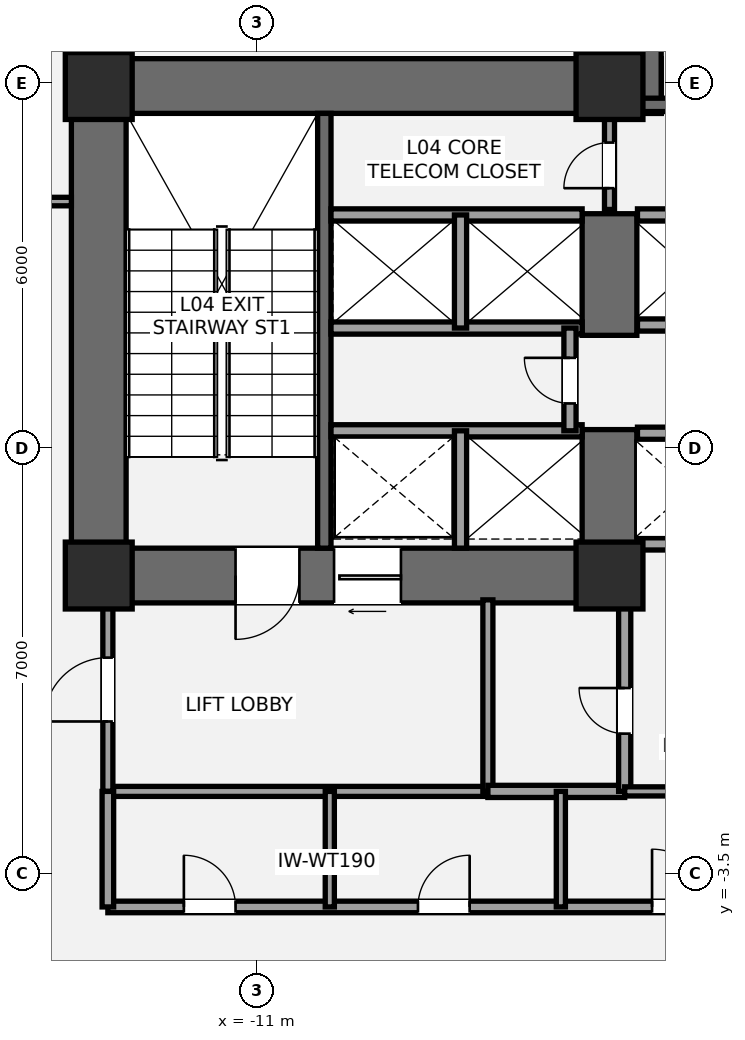
"""IFC4 building model, lengths in metres.
Left out: names, types, materials, properties, quantities, classifications, styles, units other than length and angle.
Written with IfcOpenShell. Run it as: python <this file> out.ifc"""

import sys

from ifc_helpers import new_model, si_unit, direction, frame, frame_2d, origin, origin_2d, place, context, subcontext, project, spatial, rectangle, extrude, element, fill, save


model = new_model("IFC4")
c1 = context("Model", 3, precision=1e-05, world=origin(), true_north=direction((0.0, 1.0)))
c2 = subcontext(c1, "Body", "Model", "MODEL_VIEW")
j1 = project(units=[si_unit("LENGTHUNIT", "METRE"), si_unit("PLANEANGLEUNIT", "RADIAN")], contexts=[c1])
p1 = place(None, origin())
s1 = spatial("IfcSite", under=j1, at=p1, CompositionType="ELEMENT")
p2 = place(p1, origin())
s2 = spatial("IfcBuilding", under=s1, at=p2, CompositionType="ELEMENT")
p3 = place(p2, frame((0.0, 0.0, 18.6)))
s3 = spatial("IfcBuildingStorey", under=s2, at=p3, CompositionType="ELEMENT", Elevation=18.6)
p4 = place(p3, frame((-13.6, 0.95, 0.0), z_axis=(0.0, 0.0, 1.0), x_axis=(0.0, 1.0, 0.0)))
e1 = element("IfcWall", 1, at=p4, inside=s3, PredefinedType="SHEAR", context=c2, shape_type="SweptSolid", body=[
    extrude(rectangle(XDim=8.95, YDim=0.9, at=frame_2d((4.475, 0.0))), origin(), (0.0, 0.0, 1.0), 4.2),
])
p5 = place(p3, frame((-14.05, 9.45, 0.0), z_axis=(0.0, 0.0, 1.0), x_axis=(1.0, 0.0, 0.0)))
e2 = element("IfcWall", 2, at=p5, inside=s3, PredefinedType="SHEAR", context=c2, shape_type="SweptSolid", body=[
    extrude(rectangle(XDim=9.7, YDim=0.9, at=frame_2d((4.85, 0.0))), origin(), (0.0, 0.0, 1.0), 4.2),
])
p6 = place(p3, frame((-4.75, 1.4, 0.0), z_axis=(0.0, 0.0, 1.0), x_axis=(-1.0, 0.0, 0.0)))
e3 = element("IfcWall", 3, at=p6, inside=s3, PredefinedType="SHEAR", context=c2, shape_type="SweptSolid", body=[
    extrude(rectangle(XDim=9.3, YDim=0.9, at=frame_2d((4.65, 0.0))), origin(), (0.0, 0.0, 1.0), 4.2),
])
p7 = place(p6, frame((5.55, 0.0, 0.0)))
e4 = element("IfcOpeningElement", 4, at=p7, cuts=e3, PredefinedType="OPENING", context=c2, shape_type="SweptSolid", body=[
    extrude(rectangle(XDim=1.05, YDim=2.15, at=frame_2d((0.525, 1.075))), frame((0.0, 0.46, 0.0), z_axis=(0.0, -1.0, 0.0), x_axis=(1.0, 0.0, 0.0)), (0.0, 0.0, 1.0), 0.92),
])
p8 = place(p6, frame((3.88, 0.0, 0.0)))
e5 = element("IfcOpeningElement", 5, at=p8, cuts=e3, PredefinedType="OPENING", context=c2, shape_type="SweptSolid", body=[
    extrude(rectangle(XDim=1.1, YDim=2.2, at=frame_2d((0.55, 1.1))), frame((0.0, 0.46, 0.0), z_axis=(0.0, -1.0, 0.0), x_axis=(1.0, 0.0, 0.0)), (0.0, 0.0, 1.0), 0.92),
])
p9 = place(p3, frame((-5.2, 0.95, 0.0), z_axis=(0.0, 0.0, 1.0), x_axis=(0.0, 1.0, 0.0)))
e6 = element("IfcWall", 6, at=p9, inside=s3, PredefinedType="SHEAR", context=c2, shape_type="SweptSolid", body=[
    extrude(rectangle(XDim=2.85, YDim=0.9, at=frame_2d((1.425, 0.0))), origin(), (0.0, 0.0, 1.0), 4.2),
])
p10 = place(p3, frame((-5.2, 5.35, 0.0), z_axis=(0.0, 0.0, 1.0), x_axis=(0.0, 1.0, 0.0)))
e7 = element("IfcWall", 7, at=p10, inside=s3, PredefinedType="SHEAR", context=c2, shape_type="SweptSolid", body=[
    extrude(rectangle(XDim=2.0, YDim=0.9, at=frame_2d((1.0, 0.0))), origin(), (0.0, 0.0, 1.0), 4.2),
])
p11 = place(p3, frame((-9.89, 1.85, 0.0), z_axis=(0.0, 0.0, 1.0), x_axis=(0.0, 1.0, 0.0)))
e8 = element("IfcWall", 8, at=p11, inside=s3, PredefinedType="SHEAR", context=c2, shape_type="SweptSolid", body=[
    extrude(rectangle(XDim=7.15, YDim=0.22, at=frame_2d((3.575, 0.0))), origin(), (0.0, 0.0, 1.0), 4.2),
])
p12 = place(p3, frame((-4.8, 9.0, 0.0), z_axis=(0.0, 0.0, 1.0), x_axis=(0.0, 1.0, 0.0)))
e9 = element("IfcWall", 9, at=p12, inside=s3, PredefinedType="SHEAR", context=c2, shape_type="SweptSolid", body=[
    extrude(rectangle(XDim=4.3, YDim=0.9, at=frame_2d((2.15, 0.0))), origin(), (0.0, 0.0, 1.0), 4.2),
])
p13 = place(p3, frame((-4.7, 9.14, 0.0), z_axis=(0.0, 0.0, 1.0), x_axis=(1.0, 0.0, 0.0)))
e10 = element("IfcWall", 10, at=p13, inside=s3, PredefinedType="SHEAR", context=c2, shape_type="SweptSolid", body=[
    extrude(rectangle(XDim=9.3, YDim=0.22, at=frame_2d((4.65, 0.0))), origin(), (0.0, 0.0, 1.0), 4.2),
])
p14 = place(p13, frame((1.15, 0.0, 0.0)))
e11 = element("IfcOpeningElement", 11, at=p14, cuts=e10, PredefinedType="OPENING", context=c2, shape_type="SweptSolid", body=[
    extrude(rectangle(XDim=1.05, YDim=2.15, at=frame_2d((0.525, 1.075))), frame((0.0, 0.12, 0.0), z_axis=(0.0, -1.0, 0.0), x_axis=(1.0, 0.0, 0.0)), (0.0, 0.0, 1.0), 0.24),
])
for number, where, z_axis, x_axis in (
    (12, (-13.6, 1.4, 0.0), (0.0, 0.0, 1.0), (1.0, 0.0, 0.0)),
    (13, (-13.6, 9.45, 0.0), (0.0, 0.0, 1.0), (1.0, 0.0, 0.0)),
    (14, (-5.2, 1.4, 0.0), (0.0, 0.0, 1.0), (1.0, 0.0, 0.0)),
    (15, (-5.2, 9.45, 0.0), (0.0, 0.0, 1.0), (1.0, 0.0, 0.0)),
):
    element("IfcColumn", number, at=place(p3, frame(where, z_axis=z_axis, x_axis=x_axis)), inside=s3, PredefinedType="COLUMN", context=c2, shape_type="SweptSolid", body=[
        extrude(rectangle(XDim=1.1, YDim=1.1, at=origin_2d()), origin(), (0.0, 0.0, 1.0), 4.2),
    ])
p15 = place(p3, frame((-13.45, -2.15, 0.0), z_axis=(0.0, 0.0, 1.0), x_axis=(1.0, 0.0, 0.0)))
e16 = element("IfcWall", 16, at=p15, inside=s3, PredefinedType="PARTITIONING", context=c2, shape_type="SweptSolid", body=[
    extrude(rectangle(XDim=6.25, YDim=0.165, at=frame_2d((3.125, 0.0))), origin(), (0.0, 0.0, 1.0), 3.98),
])
p16 = place(p3, frame((-13.45, -2.15, 0.0), z_axis=(0.0, 0.0, 1.0), x_axis=(0.0, 1.0, 0.0)))
e17 = element("IfcWall", 17, at=p16, inside=s3, PredefinedType="PARTITIONING", context=c2, shape_type="SweptSolid", body=[
    extrude(rectangle(XDim=3.15, YDim=0.165, at=frame_2d((1.575, 0.0))), origin(), (0.0, 0.0, 1.0), 3.433),
])
p17 = place(p16, frame((1.15, 0.0, 0.0)))
e18 = element("IfcOpeningElement", 18, at=p17, cuts=e17, PredefinedType="OPENING", context=c2, shape_type="SweptSolid", body=[
    extrude(rectangle(XDim=1.05, YDim=2.15, at=frame_2d((0.525, 1.075))), frame((0.0, 0.093, 0.0), z_axis=(0.0, -1.0, 0.0), x_axis=(1.0, 0.0, 0.0)), (0.0, 0.0, 1.0), 0.185),
])
p18 = place(p3, frame((-7.2, -2.15, 0.0), z_axis=(0.0, 0.0, 1.0), x_axis=(0.0, 1.0, 0.0)))
e19 = element("IfcWall", 19, at=p18, inside=s3, PredefinedType="PARTITIONING", context=c2, shape_type="SweptSolid", body=[
    extrude(rectangle(XDim=3.15, YDim=0.165, at=frame_2d((1.575, 0.0))), origin(), (0.0, 0.0, 1.0), 3.98),
])
p19 = place(p3, frame((-7.2, -2.15, 0.0), z_axis=(0.0, 0.0, 1.0), x_axis=(1.0, 0.0, 0.0)))
e20 = element("IfcWall", 20, at=p19, inside=s3, PredefinedType="SOLIDWALL", context=c2, shape_type="SweptSolid", body=[
    extrude(rectangle(XDim=2.25, YDim=0.2, at=frame_2d((1.125, 0.0))), origin(), (0.0, 0.0, 1.0), 3.98),
])
p20 = place(p3, frame((-4.95, -2.15, 0.0), z_axis=(0.0, 0.0, 1.0), x_axis=(0.0, 1.0, 0.0)))
e21 = element("IfcWall", 21, at=p20, inside=s3, PredefinedType="SOLIDWALL", context=c2, shape_type="SweptSolid", body=[
    extrude(rectangle(XDim=3.15, YDim=0.2, at=frame_2d((1.575, 0.0))), origin(), (0.0, 0.0, 1.0), 3.348),
])
p21 = place(p20, frame((0.95, 0.0, 0.0)))
e22 = element("IfcOpeningElement", 22, at=p21, cuts=e21, PredefinedType="OPENING", context=c2, shape_type="SweptSolid", body=[
    extrude(rectangle(XDim=0.75, YDim=2.1, at=frame_2d((0.375, 1.05))), frame((0.0, 0.11, 0.0), z_axis=(0.0, -1.0, 0.0), x_axis=(1.0, 0.0, 0.0)), (0.0, 0.0, 1.0), 0.22),
])
p22 = place(p3, frame((-9.78, 3.78, 0.0), z_axis=(0.0, 0.0, 1.0), x_axis=(1.0, 0.0, 0.0)))
e23 = element("IfcWall", 23, at=p22, inside=s3, PredefinedType="SOLIDWALL", context=c2, shape_type="SweptSolid", body=[
    extrude(rectangle(XDim=4.13, YDim=0.2, at=frame_2d((2.065, 0.0))), origin(), (0.0, 0.0, 1.0), 3.98),
])
p23 = place(p3, frame((-7.65, 1.85, 0.0), z_axis=(0.0, 0.0, 1.0), x_axis=(0.0, 1.0, 0.0)))
e24 = element("IfcWall", 24, at=p23, inside=s3, PredefinedType="SOLIDWALL", context=c2, shape_type="SweptSolid", body=[
    extrude(rectangle(XDim=1.93, YDim=0.2, at=frame_2d((0.965, 0.0))), origin(), (0.0, 0.0, 1.0), 3.98),
])
for number, where, z_axis, x_axis in (
    (25, (-9.78, 5.47, 0.0), (0.0, 0.0, 1.0), (1.0, 0.0, 0.0)),
    (26, (-9.78, 7.33, 0.0), (0.0, 0.0, 1.0), (1.0, 0.0, 0.0)),
):
    element("IfcWall", number, at=place(p3, frame(where, z_axis=z_axis, x_axis=x_axis)), inside=s3, PredefinedType="SOLIDWALL", context=c2, shape_type="SweptSolid", body=[
        extrude(rectangle(XDim=4.13, YDim=0.2, at=frame_2d((2.065, 0.0))), origin(), (0.0, 0.0, 1.0), 3.98),
    ])
p24 = place(p3, frame((-7.65, 5.47, 0.0), z_axis=(0.0, 0.0, 1.0), x_axis=(0.0, 1.0, 0.0)))
e27 = element("IfcWall", 27, at=p24, inside=s3, PredefinedType="SOLIDWALL", context=c2, shape_type="SweptSolid", body=[
    extrude(rectangle(XDim=1.86, YDim=0.2, at=frame_2d((0.93, 0.0))), origin(), (0.0, 0.0, 1.0), 3.98),
])
p25 = place(p3, frame((-5.85, 3.78, 0.0), z_axis=(0.0, 0.0, 1.0), x_axis=(0.0, 1.0, 0.0)))
e28 = element("IfcWall", 28, at=p25, inside=s3, PredefinedType="SOLIDWALL", context=c2, shape_type="SweptSolid", body=[
    extrude(rectangle(XDim=1.69, YDim=0.2, at=frame_2d((0.845, 0.0))), origin(), (0.0, 0.0, 1.0), 3.98),
])
p26 = place(p25, frame((0.45, 0.0, 0.0)))
e29 = element("IfcOpeningElement", 29, at=p26, cuts=e28, PredefinedType="OPENING", context=c2, shape_type="SweptSolid", body=[
    extrude(rectangle(XDim=0.75, YDim=2.1, at=frame_2d((0.375, 1.05))), frame((0.0, 0.11, 0.0), z_axis=(0.0, -1.0, 0.0), x_axis=(1.0, 0.0, 0.0)), (0.0, 0.0, 1.0), 0.22),
])
p27 = place(p3, frame((-4.74, 1.92, 0.0), z_axis=(0.0, 0.0, 1.0), x_axis=(1.0, 0.0, 0.0)))
e30 = element("IfcWall", 30, at=p27, inside=s3, PredefinedType="SOLIDWALL", context=c2, shape_type="SweptSolid", body=[
    extrude(rectangle(XDim=3.86, YDim=0.2, at=frame_2d((1.93, 0.0))), origin(), (0.0, 0.0, 1.0), 2.97),
])
p28 = place(p27, frame((0.55, 0.0, 0.0)))
e31 = element("IfcOpeningElement", 31, at=p28, cuts=e30, PredefinedType="OPENING", context=c2, shape_type="SweptSolid", body=[
    extrude(rectangle(XDim=1.1, YDim=2.2, at=frame_2d((0.55, 1.1))), frame((0.0, 0.11, 0.0), z_axis=(0.0, -1.0, 0.0), x_axis=(1.0, 0.0, 0.0)), (0.0, 0.0, 1.0), 0.22),
])
p29 = place(p27, frame((2.55, 0.0, 0.0)))
e32 = element("IfcOpeningElement", 32, at=p29, cuts=e30, PredefinedType="OPENING", context=c2, shape_type="SweptSolid", body=[
    extrude(rectangle(XDim=1.1, YDim=2.2, at=frame_2d((0.55, 1.1))), frame((0.0, 0.11, 0.0), z_axis=(0.0, -1.0, 0.0), x_axis=(1.0, 0.0, 0.0)), (0.0, 0.0, 1.0), 0.22),
])
for number, where, z_axis, x_axis in (
    (33, (-4.74, 3.74, 0.0), (0.0, 0.0, 1.0), (1.0, 0.0, 0.0)),
    (34, (-4.74, 5.52, 0.0), (0.0, 0.0, 1.0), (1.0, 0.0, 0.0)),
    (35, (-4.74, 7.33, 0.0), (0.0, 0.0, 1.0), (1.0, 0.0, 0.0)),
):
    element("IfcWall", number, at=place(p3, frame(where, z_axis=z_axis, x_axis=x_axis)), inside=s3, PredefinedType="SOLIDWALL", context=c2, shape_type="SweptSolid", body=[
        extrude(rectangle(XDim=3.86, YDim=0.2, at=frame_2d((1.93, 0.0))), origin(), (0.0, 0.0, 1.0), 3.98),
    ])
p30 = place(p3, frame((-5.2, 7.42, 0.0), z_axis=(0.0, 0.0, 1.0), x_axis=(0.0, 1.0, 0.0)))
e36 = element("IfcWall", 36, at=p30, inside=s3, PredefinedType="PARTITIONING", context=c2, shape_type="SweptSolid", body=[
    extrude(rectangle(XDim=1.58, YDim=0.165, at=frame_2d((0.79, 0.0))), origin(), (0.0, 0.0, 1.0), 3.98),
])
p31 = place(p30, frame((0.35, 0.0, 0.0)))
e37 = element("IfcOpeningElement", 37, at=p31, cuts=e36, PredefinedType="OPENING", context=c2, shape_type="SweptSolid", body=[
    extrude(rectangle(XDim=0.75, YDim=2.1, at=frame_2d((0.375, 1.05))), frame((0.0, 0.093, 0.0), z_axis=(0.0, -1.0, 0.0), x_axis=(1.0, 0.0, 0.0)), (0.0, 0.0, 1.0), 0.185),
])
p32 = place(p3, frame((-13.45, -4.05, 0.0), z_axis=(0.0, 0.0, 1.0), x_axis=(1.0, 0.0, 0.0)))
e38 = element("IfcWall", 38, at=p32, inside=s3, PredefinedType="PLUMBINGWALL", context=c2, shape_type="SweptSolid", body=[
    extrude(rectangle(XDim=11.35, YDim=0.19, at=frame_2d((5.675, 0.0))), origin(), (0.0, 0.0, 1.0), 3.507),
])
p33 = place(p32, frame((1.25, 0.0, 0.0)))
e39 = element("IfcOpeningElement", 39, at=p33, cuts=e38, PredefinedType="OPENING", context=c2, shape_type="SweptSolid", body=[
    extrude(rectangle(XDim=0.85, YDim=2.1, at=frame_2d((0.425, 1.05))), frame((0.0, 0.105, 0.0), z_axis=(0.0, -1.0, 0.0), x_axis=(1.0, 0.0, 0.0)), (0.0, 0.0, 1.0), 0.21),
])
p34 = place(p32, frame((5.1, 0.0, 0.0)))
e40 = element("IfcOpeningElement", 40, at=p34, cuts=e38, PredefinedType="OPENING", context=c2, shape_type="SweptSolid", body=[
    extrude(rectangle(XDim=0.85, YDim=2.1, at=frame_2d((0.425, 1.05))), frame((0.0, 0.105, 0.0), z_axis=(0.0, -1.0, 0.0), x_axis=(1.0, 0.0, 0.0)), (0.0, 0.0, 1.0), 0.21),
])
p35 = place(p32, frame((8.95, 0.0, 0.0)))
e41 = element("IfcOpeningElement", 41, at=p35, cuts=e38, PredefinedType="OPENING", context=c2, shape_type="SweptSolid", body=[
    extrude(rectangle(XDim=0.95, YDim=2.15, at=frame_2d((0.475, 1.075))), frame((0.0, 0.105, 0.0), z_axis=(0.0, -1.0, 0.0), x_axis=(1.0, 0.0, 0.0)), (0.0, 0.0, 1.0), 0.21),
])
p36 = place(p3, frame((-4.95, -2.15, 0.0), z_axis=(0.0, 0.0, 1.0), x_axis=(1.0, 0.0, 0.0)))
e42 = element("IfcWall", 42, at=p36, inside=s3, PredefinedType="PLUMBINGWALL", context=c2, shape_type="SweptSolid", body=[
    extrude(rectangle(XDim=2.85, YDim=0.15, at=frame_2d((1.425, 0.0))), origin(), (0.0, 0.0, 1.0), 3.98),
])
p37 = place(p3, frame((-13.45, -4.05, 0.0), z_axis=(0.0, 0.0, 1.0), x_axis=(0.0, 1.0, 0.0)))
e43 = element("IfcWall", 43, at=p37, inside=s3, PredefinedType="PLUMBINGWALL", context=c2, shape_type="SweptSolid", body=[
    extrude(rectangle(XDim=1.9, YDim=0.19, at=frame_2d((0.95, 0.0))), origin(), (0.0, 0.0, 1.0), 3.98),
])
p38 = place(p3, frame((-9.8, -4.05, 0.0), z_axis=(0.0, 0.0, 1.0), x_axis=(0.0, 1.0, 0.0)))
e44 = element("IfcWall", 44, at=p38, inside=s3, PredefinedType="PLUMBINGWALL", context=c2, shape_type="SweptSolid", body=[
    extrude(rectangle(XDim=1.9, YDim=0.15, at=frame_2d((0.95, 0.0))), origin(), (0.0, 0.0, 1.0), 3.98),
])
p39 = place(p3, frame((-6.0, -4.05, 0.0), z_axis=(0.0, 0.0, 1.0), x_axis=(0.0, 1.0, 0.0)))
e45 = element("IfcWall", 45, at=p39, inside=s3, PredefinedType="PLUMBINGWALL", context=c2, shape_type="SweptSolid", body=[
    extrude(rectangle(XDim=1.9, YDim=0.15, at=frame_2d((0.95, 0.0))), origin(), (0.0, 0.0, 1.0), 3.348),
])
p40 = place(p3, frame((-18.6, 7.55, 0.0), z_axis=(0.0, 0.0, 1.0), x_axis=(1.0, 0.0, 0.0)))
e46 = element("IfcWall", 46, at=p40, inside=s3, PredefinedType="PARTITIONING", context=c2, shape_type="SweptSolid", body=[
    extrude(rectangle(XDim=4.55, YDim=0.14, at=frame_2d((2.275, 0.0))), origin(), (0.0, 0.0, 1.0), 3.433),
])
p41 = place(p40, frame((0.32, 0.0, 0.0)))
e47 = element("IfcOpeningElement", 47, at=p41, cuts=e46, PredefinedType="OPENING", context=c2, shape_type="SweptSolid", body=[
    extrude(rectangle(XDim=0.92, YDim=2.15, at=frame_2d((0.46, 1.075))), frame((0.0, 0.08, 0.0), z_axis=(0.0, -1.0, 0.0), x_axis=(1.0, 0.0, 0.0)), (0.0, 0.0, 1.0), 0.16),
])
p42 = place(p7, origin())
e48 = element("IfcDoor", 48, at=p42, inside=s3, OperationType="SINGLE_SWING_RIGHT", PredefinedType="DOOR", context=c2, shape_type="SweptSolid", body=[
    extrude(rectangle(XDim=1.05, YDim=2.15, at=frame_2d((0.525, 1.075))), frame((0.0, 0.025, 0.0), z_axis=(0.0, -1.0, 0.0), x_axis=(1.0, 0.0, 0.0)), (0.0, 0.0, 1.0), 0.05),
])
fill(e4, e48)
p43 = place(p17, origin())
e49 = element("IfcDoor", 49, at=p43, inside=s3, OperationType="SINGLE_SWING_LEFT", PredefinedType="DOOR", context=c2, shape_type="SweptSolid", body=[
    extrude(rectangle(XDim=1.05, YDim=2.15, at=frame_2d((0.525, 1.075))), frame((0.0, 0.025, 0.0), z_axis=(0.0, -1.0, 0.0), x_axis=(1.0, 0.0, 0.0)), (0.0, 0.0, 1.0), 0.05),
])
fill(e18, e49)
p44 = place(p21, origin())
e50 = element("IfcDoor", 50, at=p44, inside=s3, OperationType="SINGLE_SWING_RIGHT", PredefinedType="DOOR", context=c2, shape_type="SweptSolid", body=[
    extrude(rectangle(XDim=0.75, YDim=2.1, at=frame_2d((0.375, 1.05))), frame((0.0, 0.025, 0.0), z_axis=(0.0, -1.0, 0.0), x_axis=(1.0, 0.0, 0.0)), (0.0, 0.0, 1.0), 0.05),
])
fill(e22, e50)
p45 = place(p8, origin())
e51 = element("IfcDoor", 51, at=p45, inside=s3, OperationType="SLIDING_TO_LEFT", PredefinedType="DOOR", context=c2, shape_type="SweptSolid", body=[
    extrude(rectangle(XDim=1.1, YDim=2.2, at=frame_2d((0.55, 1.1))), frame((0.0, 0.025, 0.0), z_axis=(0.0, -1.0, 0.0), x_axis=(1.0, 0.0, 0.0)), (0.0, 0.0, 1.0), 0.05),
])
fill(e5, e51)
p46 = place(p26, origin())
e52 = element("IfcDoor", 52, at=p46, inside=s3, OperationType="SINGLE_SWING_RIGHT", PredefinedType="DOOR", context=c2, shape_type="SweptSolid", body=[
    extrude(rectangle(XDim=0.75, YDim=2.1, at=frame_2d((0.375, 1.05))), frame((0.0, 0.025, 0.0), z_axis=(0.0, -1.0, 0.0), x_axis=(1.0, 0.0, 0.0)), (0.0, 0.0, 1.0), 0.05),
])
fill(e29, e52)
p47 = place(p31, origin())
e53 = element("IfcDoor", 53, at=p47, inside=s3, OperationType="SINGLE_SWING_LEFT", PredefinedType="DOOR", context=c2, shape_type="SweptSolid", body=[
    extrude(rectangle(XDim=0.75, YDim=2.1, at=frame_2d((0.375, 1.05))), frame((0.0, 0.025, 0.0), z_axis=(0.0, -1.0, 0.0), x_axis=(1.0, 0.0, 0.0)), (0.0, 0.0, 1.0), 0.05),
])
fill(e37, e53)
p48 = place(p33, origin())
e54 = element("IfcDoor", 54, at=p48, inside=s3, OperationType="SINGLE_SWING_LEFT", PredefinedType="DOOR", context=c2, shape_type="SweptSolid", body=[
    extrude(rectangle(XDim=0.85, YDim=2.1, at=frame_2d((0.425, 1.05))), frame((0.0, 0.025, 0.0), z_axis=(0.0, -1.0, 0.0), x_axis=(1.0, 0.0, 0.0)), (0.0, 0.0, 1.0), 0.05),
])
fill(e39, e54)
p49 = place(p34, origin())
e55 = element("IfcDoor", 55, at=p49, inside=s3, OperationType="SINGLE_SWING_RIGHT", PredefinedType="DOOR", context=c2, shape_type="SweptSolid", body=[
    extrude(rectangle(XDim=0.85, YDim=2.1, at=frame_2d((0.425, 1.05))), frame((0.0, 0.025, 0.0), z_axis=(0.0, -1.0, 0.0), x_axis=(1.0, 0.0, 0.0)), (0.0, 0.0, 1.0), 0.05),
])
fill(e40, e55)
p50 = place(p35, origin())
e56 = element("IfcDoor", 56, at=p50, inside=s3, OperationType="SINGLE_SWING_LEFT", PredefinedType="DOOR", context=c2, shape_type="SweptSolid", body=[
    extrude(rectangle(XDim=0.95, YDim=2.15, at=frame_2d((0.475, 1.075))), frame((0.0, 0.025, 0.0), z_axis=(0.0, -1.0, 0.0), x_axis=(1.0, 0.0, 0.0)), (0.0, 0.0, 1.0), 0.05),
])
fill(e41, e56)
save(model, sys.argv[1])
